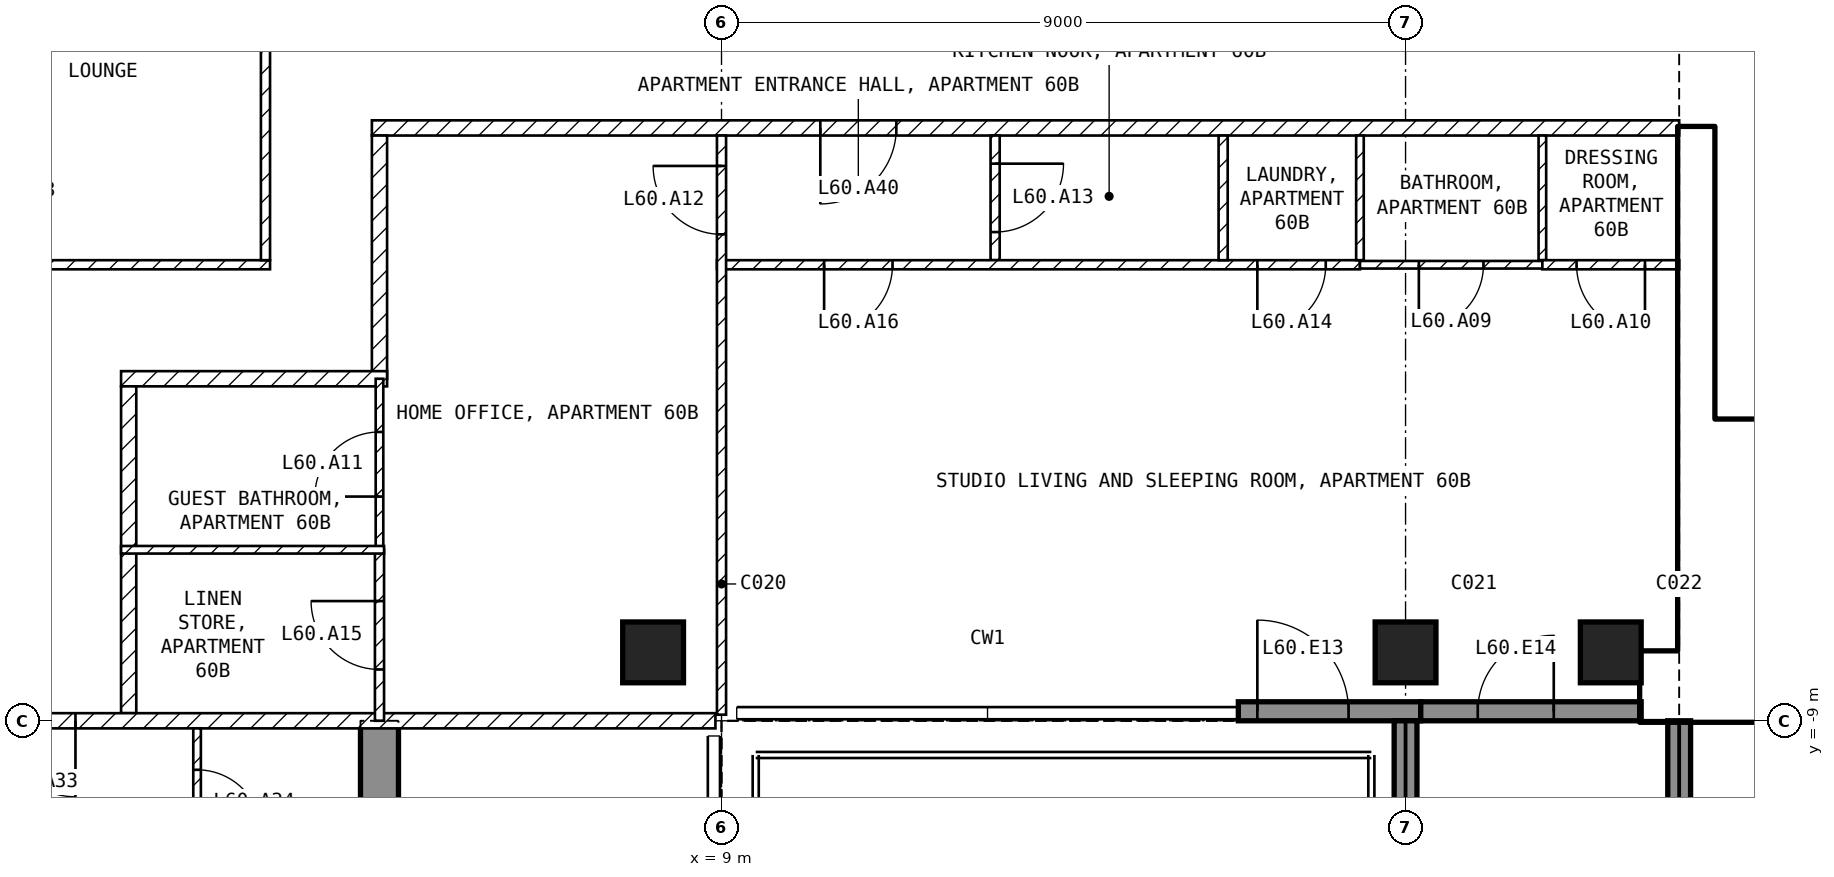
"""IFC4 building model, lengths in metres.
Left out: names, types, materials, properties, quantities, classifications, styles, units other than length and angle.
Written with IfcOpenShell. Run it as: python <this file> out.ifc"""

import sys

from ifc_helpers import new_model, si_unit, direction, frame, frame_2d, origin, origin_2d, place, context, subcontext, project, spatial, polyline, rectangle, outline, extrude, element, fill, save


model = new_model("IFC4")
c1 = context("Model", 3, precision=1e-05, world=origin(), true_north=direction((0.0, 1.0)))
c2 = subcontext(c1, "Body", "Model", "MODEL_VIEW")
j1 = project(units=[si_unit("LENGTHUNIT", "METRE"), si_unit("PLANEANGLEUNIT", "RADIAN")], contexts=[c1])
p1 = place(None, origin())
s1 = spatial("IfcSite", under=j1, at=p1, CompositionType="ELEMENT")
p2 = place(p1, origin())
s2 = spatial("IfcBuilding", under=s1, at=p2, CompositionType="ELEMENT")
p3 = place(p2, frame((0.0, 0.0, 239.5)))
s3 = spatial("IfcBuildingStorey", under=s2, at=p3, CompositionType="ELEMENT", Elevation=239.5)
for number, where, z_axis, x_axis in (
    (1, (8.1, -8.1, -0.25), (0.0, 0.0, 1.0), (1.0, 0.0, 0.0)),
    (2, (18.0, -8.1, -0.25), (0.0, 0.0, 1.0), (1.0, 0.0, 0.0)),
    (3, (20.7, -8.1, -0.25), (0.0, 0.0, 1.0), (1.0, 0.0, 0.0)),
):
    element("IfcColumn", number, at=place(p3, frame(where, z_axis=z_axis, x_axis=x_axis)), inside=s3, PredefinedType="COLUMN", context=c2, shape_type="SweptSolid", body=[
        extrude(rectangle(XDim=0.8, YDim=0.8, at=origin_2d()), origin(), (0.0, 0.0, 1.0), 3.5),
    ])
p4 = place(p3, frame((4.25, -16.7, -0.25), z_axis=(1.0, 0.0, 0.0), x_axis=(0.0, 1.0, 0.0)))
e4 = element("IfcWall", 4, at=p4, inside=s3, PredefinedType="SHEAR", context=c2, shape_type="SweptSolid", body=[
    extrude(outline(polyline([(0.0, 0.0), (3.2, 0.0), (3.2, 2.65), (5.6, 2.65), (5.6, 0.0), (7.7, 0.0), (7.7, 3.5), (0.0, 3.5), (0.0, 0.0)])), origin(), (0.0, 0.0, 1.0), 0.5),
])
p5 = place(p3, frame((15.8, -8.875, 0.0), z_axis=(0.0, 0.0, 1.0), x_axis=(1.0, 0.0, 0.0)))
e5 = element("IfcWall", 5, at=p5, inside=s3, PredefinedType="SOLIDWALL", context=c2, shape_type="SweptSolid", body=[
    extrude(rectangle(XDim=2.4, YDim=0.25, at=frame_2d((1.2, 0.0))), origin(), (0.0, 0.0, 1.0), 3.25),
])
p6 = place(p5, frame((0.25, 0.0, 0.0)))
e6 = element("IfcOpeningElement", 6, at=p6, cuts=e5, PredefinedType="OPENING", context=c2, shape_type="SweptSolid", body=[
    extrude(rectangle(XDim=1.2, YDim=2.4, at=frame_2d((0.6, 1.2))), frame((0.0, 0.135, 0.0), z_axis=(0.0, -1.0, 0.0), x_axis=(1.0, 0.0, 0.0)), (0.0, 0.0, 1.0), 0.27),
])
p7 = place(p3, frame((18.2, -8.875, 0.0), z_axis=(0.0, 0.0, 1.0), x_axis=(1.0, 0.0, 0.0)))
e7 = element("IfcWall", 7, at=p7, inside=s3, PredefinedType="SOLIDWALL", context=c2, shape_type="SweptSolid", body=[
    extrude(rectangle(XDim=2.9, YDim=0.25, at=frame_2d((1.45, 0.0))), origin(), (0.0, 0.0, 1.0), 3.25),
])
p8 = place(p7, frame((0.75, 0.0, 0.0)))
e8 = element("IfcOpeningElement", 8, at=p8, cuts=e7, PredefinedType="OPENING", context=c2, shape_type="SweptSolid", body=[
    extrude(rectangle(XDim=1.0, YDim=2.4, at=frame_2d((0.5, 1.2))), frame((0.0, 0.135, 0.0), z_axis=(0.0, -1.0, 0.0), x_axis=(1.0, 0.0, 0.0)), (0.0, 0.0, 1.0), 0.27),
])
p9 = place(p3, frame((18.0, -9.0, 0.0), z_axis=(0.0, 0.0, 1.0), x_axis=(0.0, -1.0, 0.0)))
e9 = element("IfcWall", 9, at=p9, inside=s3, PredefinedType="SOLIDWALL", context=c2, shape_type="SweptSolid", body=[
    extrude(rectangle(XDim=2.74, YDim=0.3, at=frame_2d((1.37, 0.0))), origin(), (0.0, 0.0, 1.0), 3.25),
])
p10 = place(p3, frame((21.6, -9.0, 0.0), z_axis=(0.0, 0.0, 1.0), x_axis=(0.0, -1.0, 0.0)))
e10 = element("IfcWall", 10, at=p10, inside=s3, PredefinedType="SOLIDWALL", context=c2, shape_type="SweptSolid", body=[
    extrude(rectangle(XDim=2.7, YDim=0.3, at=frame_2d((1.35, 0.0))), origin(), (0.0, 0.0, 1.0), 3.25),
])
p11 = place(p3, frame((21.1, -8.55, 0.0), z_axis=(0.0, 0.0, 1.0), x_axis=(1.0, 0.0, 0.0)))
e11 = element("IfcWall", 11, at=p11, inside=s3, PredefinedType="SHEAR", context=c2, shape_type="SweptSolid", body=[
    extrude(rectangle(XDim=9.1, YDim=0.9, at=frame_2d((4.55, 0.0))), origin(), (0.0, 0.0, 1.0), 3.25),
])
p12 = place(p3, frame((21.825, -8.1, 0.0), z_axis=(0.0, 0.0, 1.0), x_axis=(0.0, 1.0, 0.0)))
e12 = element("IfcWall", 12, at=p12, inside=s3, PredefinedType="SHEAR", context=c2, shape_type="SweptSolid", body=[
    extrude(rectangle(XDim=6.9, YDim=0.45, at=frame_2d((3.45, 0.0))), origin(), (0.0, 0.0, 1.0), 3.25),
])
p13 = place(p3, frame((22.05, -5.15, 0.0), z_axis=(0.0, 0.0, 1.0), x_axis=(1.0, 0.0, 0.0)))
e13 = element("IfcWall", 13, at=p13, inside=s3, PredefinedType="SOLIDWALL", context=c2, shape_type="SweptSolid", body=[
    extrude(rectangle(XDim=6.3, YDim=0.2, at=frame_2d((3.15, 0.0))), origin(), (0.0, 0.0, 1.0), 3.25),
])
p14 = place(p13, frame((0.2, 0.0, 0.0)))
e14 = element("IfcOpeningElement", 14, at=p14, cuts=e13, PredefinedType="OPENING", context=c2, shape_type="SweptSolid", body=[
    extrude(rectangle(XDim=1.0, YDim=2.1, at=frame_2d((0.5, 1.05))), frame((0.0, 0.11, 0.0), z_axis=(0.0, -1.0, 0.0), x_axis=(1.0, 0.0, 0.0)), (0.0, 0.0, 1.0), 0.22),
])
p15 = place(p3, frame((-3.06, -3.0, 0.0), z_axis=(0.0, 0.0, 1.0), x_axis=(1.0, 0.0, 0.0)))
e15 = element("IfcWall", 15, at=p15, inside=s3, PredefinedType="PARTITIONING", context=c2, shape_type="SweptSolid", body=[
    extrude(rectangle(XDim=6.12, YDim=0.12, at=frame_2d((3.06, 0.0))), origin(), (0.0, 0.0, 1.0), 3.25),
])
p16 = place(p3, frame((3.0, -2.94, 0.0), z_axis=(0.0, 0.0, 1.0), x_axis=(0.0, 1.0, 0.0)))
e16 = element("IfcWall", 16, at=p16, inside=s3, PredefinedType="PARTITIONING", context=c2, shape_type="SweptSolid", body=[
    extrude(rectangle(XDim=5.88, YDim=0.12, at=frame_2d((2.94, 0.0))), origin(), (0.0, 0.0, 1.0), 3.25),
])
p17 = place(p3, frame((21.6, -1.2, 0.0), z_axis=(0.0, 0.0, 1.0), x_axis=(-1.0, 0.0, 0.0)))
e17 = element("IfcWall", 17, at=p17, inside=s3, PredefinedType="PARTITIONING", context=c2, shape_type="SweptSolid", body=[
    extrude(rectangle(XDim=17.2, YDim=0.2, at=frame_2d((8.6, 0.0))), origin(), (0.0, 0.0, 1.0), 3.25),
])
p18 = place(p17, frame((10.3, 0.0, 0.0)))
e18 = element("IfcOpeningElement", 18, at=p18, cuts=e17, PredefinedType="OPENING", context=c2, shape_type="SweptSolid", body=[
    extrude(rectangle(XDim=1.0, YDim=2.1, at=frame_2d((0.5, 1.05))), frame((0.0, 0.11, 0.0), z_axis=(0.0, -1.0, 0.0), x_axis=(1.0, 0.0, 0.0)), (0.0, 0.0, 1.0), 0.22),
])
p19 = place(p3, frame((4.5, -1.3, 0.0), z_axis=(0.0, 0.0, 1.0), x_axis=(0.0, -1.0, 0.0)))
e19 = element("IfcWall", 19, at=p19, inside=s3, PredefinedType="PARTITIONING", context=c2, shape_type="SweptSolid", body=[
    extrude(rectangle(XDim=3.2, YDim=0.2, at=frame_2d((1.6, 0.0))), origin(), (0.0, 0.0, 1.0), 3.25),
])
p20 = place(p3, frame((4.6, -4.5, 0.0), z_axis=(0.0, 0.0, 1.0), x_axis=(-1.0, 0.0, 0.0)))
e20 = element("IfcWall", 20, at=p20, inside=s3, PredefinedType="PARTITIONING", context=c2, shape_type="SweptSolid", body=[
    extrude(rectangle(XDim=3.5, YDim=0.2, at=frame_2d((1.75, 0.0))), origin(), (0.0, 0.0, 1.0), 3.25),
])
p21 = place(p3, frame((1.2, -4.6, 0.0), z_axis=(0.0, 0.0, 1.0), x_axis=(0.0, -1.0, 0.0)))
e21 = element("IfcWall", 21, at=p21, inside=s3, PredefinedType="PARTITIONING", context=c2, shape_type="SweptSolid", body=[
    extrude(rectangle(XDim=4.3, YDim=0.2, at=frame_2d((2.15, 0.0))), origin(), (0.0, 0.0, 1.0), 3.25),
])
p22 = place(p3, frame((8.92, -9.0, 0.0), z_axis=(0.0, 0.0, 1.0), x_axis=(-1.0, 0.0, 0.0)))
e22 = element("IfcWall", 22, at=p22, inside=s3, PredefinedType="PARTITIONING", context=c2, shape_type="SweptSolid", body=[
    extrude(rectangle(XDim=17.84, YDim=0.2, at=frame_2d((8.92, 0.0))), origin(), (0.0, 0.0, 1.0), 3.25),
])
p23 = place(p22, frame((8.42, 0.0, 0.0)))
e23 = element("IfcOpeningElement", 23, at=p23, cuts=e22, PredefinedType="OPENING", context=c2, shape_type="SweptSolid", body=[
    extrude(rectangle(XDim=1.0, YDim=2.1, at=frame_2d((0.5, 1.05))), frame((0.0, 0.11, 0.0), z_axis=(0.0, -1.0, 0.0), x_axis=(1.0, 0.0, 0.0)), (0.0, 0.0, 1.0), 0.22),
])
p24 = place(p3, frame((12.6, -1.3, 0.0), z_axis=(0.0, 0.0, 1.0), x_axis=(0.0, -1.0, 0.0)))
e24 = element("IfcWall", 24, at=p24, inside=s3, PredefinedType="PARTITIONING", context=c2, shape_type="SweptSolid", body=[
    extrude(rectangle(XDim=1.64, YDim=0.12, at=frame_2d((0.82, 0.0))), origin(), (0.0, 0.0, 1.0), 3.25),
])
p25 = place(p24, frame((0.37, 0.0, 0.0)))
e25 = element("IfcOpeningElement", 25, at=p25, cuts=e24, PredefinedType="OPENING", context=c2, shape_type="SweptSolid", body=[
    extrude(rectangle(XDim=0.9, YDim=2.1, at=frame_2d((0.45, 1.05))), frame((0.0, 0.07, 0.0), z_axis=(0.0, -1.0, 0.0), x_axis=(1.0, 0.0, 0.0)), (0.0, 0.0, 1.0), 0.14),
])
p26 = place(p3, frame((17.4, -3.0, 0.0), z_axis=(0.0, 0.0, 1.0), x_axis=(-1.0, 0.0, 0.0)))
e26 = element("IfcWall", 26, at=p26, inside=s3, PredefinedType="PARTITIONING", context=c2, shape_type="SweptSolid", body=[
    extrude(rectangle(XDim=8.46, YDim=0.12, at=frame_2d((4.23, 0.0))), origin(), (0.0, 0.0, 1.0), 3.25),
])
p27 = place(p26, frame((0.45, 0.0, 0.0)))
e27 = element("IfcOpeningElement", 27, at=p27, cuts=e26, PredefinedType="OPENING", context=c2, shape_type="SweptSolid", body=[
    extrude(rectangle(XDim=0.9, YDim=2.1, at=frame_2d((0.45, 1.05))), frame((0.0, 0.07, 0.0), z_axis=(0.0, -1.0, 0.0), x_axis=(1.0, 0.0, 0.0)), (0.0, 0.0, 1.0), 0.14),
])
p28 = place(p26, frame((6.15, 0.0, 0.0)))
e28 = element("IfcOpeningElement", 28, at=p28, cuts=e26, PredefinedType="OPENING", context=c2, shape_type="SweptSolid", body=[
    extrude(rectangle(XDim=0.9, YDim=2.1, at=frame_2d((0.45, 1.05))), frame((0.0, 0.07, 0.0), z_axis=(0.0, -1.0, 0.0), x_axis=(1.0, 0.0, 0.0)), (0.0, 0.0, 1.0), 0.14),
])
p29 = place(p3, frame((9.0, -8.92, 0.0), z_axis=(0.0, 0.0, 1.0), x_axis=(0.0, 1.0, 0.0)))
e29 = element("IfcWall", 29, at=p29, inside=s3, PredefinedType="PARTITIONING", context=c2, shape_type="SweptSolid", body=[
    extrude(rectangle(XDim=7.62, YDim=0.12, at=frame_2d((3.81, 0.0))), origin(), (0.0, 0.0, 1.0), 3.25),
])
p30 = place(p29, frame((6.32, 0.0, 0.0)))
e30 = element("IfcOpeningElement", 30, at=p30, cuts=e29, PredefinedType="OPENING", context=c2, shape_type="SweptSolid", body=[
    extrude(rectangle(XDim=0.9, YDim=2.1, at=frame_2d((0.45, 1.05))), frame((0.0, 0.07, 0.0), z_axis=(0.0, -1.0, 0.0), x_axis=(1.0, 0.0, 0.0)), (0.0, 0.0, 1.0), 0.14),
])
p31 = place(p3, frame((15.6, -1.3, 0.0), z_axis=(0.0, 0.0, 1.0), x_axis=(0.0, -1.0, 0.0)))
e31 = element("IfcWall", 31, at=p31, inside=s3, PredefinedType="PARTITIONING", context=c2, shape_type="SweptSolid", body=[
    extrude(rectangle(XDim=1.64, YDim=0.12, at=frame_2d((0.82, 0.0))), origin(), (0.0, 0.0, 1.0), 3.25),
])
for number, where, z_axis, x_axis in (
    (32, (17.4, -1.3, 0.0), (0.0, 0.0, 1.0), (0.0, -1.0, 0.0)),
    (33, (19.8, -1.3, 0.0), (0.0, 0.0, 1.0), (0.0, -1.0, 0.0)),
):
    element("IfcWall", number, at=place(p3, frame(where, z_axis=z_axis, x_axis=x_axis)), inside=s3, PredefinedType="PARTITIONING", context=c2, shape_type="SweptSolid", body=[
        extrude(rectangle(XDim=1.64, YDim=0.1, at=frame_2d((0.82, 0.0))), origin(), (0.0, 0.0, 1.0), 3.25),
    ])
p32 = place(p3, frame((19.8, -3.0, 0.0), z_axis=(0.0, 0.0, 1.0), x_axis=(-1.0, 0.0, 0.0)))
e34 = element("IfcWall", 34, at=p32, inside=s3, PredefinedType="PARTITIONING", context=c2, shape_type="SweptSolid", body=[
    extrude(rectangle(XDim=2.4, YDim=0.1, at=frame_2d((1.2, 0.0))), origin(), (0.0, 0.0, 1.0), 3.25),
])
p33 = place(p32, frame((0.775, 0.0, 0.0)))
e35 = element("IfcOpeningElement", 35, at=p33, cuts=e34, PredefinedType="OPENING", context=c2, shape_type="SweptSolid", body=[
    extrude(rectangle(XDim=0.85, YDim=2.1, at=frame_2d((0.425, 1.05))), frame((0.0, 0.06, 0.0), z_axis=(0.0, -1.0, 0.0), x_axis=(1.0, 0.0, 0.0)), (0.0, 0.0, 1.0), 0.12),
])
p34 = place(p3, frame((21.6, -3.0, 0.0), z_axis=(0.0, 0.0, 1.0), x_axis=(-1.0, 0.0, 0.0)))
e36 = element("IfcWall", 36, at=p34, inside=s3, PredefinedType="PARTITIONING", context=c2, shape_type="SweptSolid", body=[
    extrude(rectangle(XDim=1.8, YDim=0.12, at=frame_2d((0.9, 0.0))), origin(), (0.0, 0.0, 1.0), 3.25),
])
p35 = place(p34, frame((0.45, 0.0, 0.0)))
e37 = element("IfcOpeningElement", 37, at=p35, cuts=e36, PredefinedType="OPENING", context=c2, shape_type="SweptSolid", body=[
    extrude(rectangle(XDim=0.9, YDim=2.1, at=frame_2d((0.45, 1.05))), frame((0.0, 0.07, 0.0), z_axis=(0.0, -1.0, 0.0), x_axis=(1.0, 0.0, 0.0)), (0.0, 0.0, 1.0), 0.14),
])
p36 = place(p3, frame((4.5, -6.75, 0.0), z_axis=(0.0, 0.0, 1.0), x_axis=(0.0, 1.0, 0.0)))
e38 = element("IfcWall", 38, at=p36, inside=s3, PredefinedType="PARTITIONING", context=c2, shape_type="SweptSolid", body=[
    extrude(rectangle(XDim=2.25, YDim=0.1, at=frame_2d((1.125, 0.0))), origin(), (0.0, 0.0, 1.0), 3.25),
])
p37 = place(p36, frame((0.7, 0.0, 0.0)))
e39 = element("IfcOpeningElement", 39, at=p37, cuts=e38, PredefinedType="OPENING", context=c2, shape_type="SweptSolid", body=[
    extrude(rectangle(XDim=0.85, YDim=2.1, at=frame_2d((0.425, 1.05))), frame((0.0, 0.06, 0.0), z_axis=(0.0, -1.0, 0.0), x_axis=(1.0, 0.0, 0.0)), (0.0, 0.0, 1.0), 0.12),
])
p38 = place(p3, frame((4.5, -9.0, 0.0), z_axis=(0.0, 0.0, 1.0), x_axis=(0.0, 1.0, 0.0)))
e40 = element("IfcWall", 40, at=p38, inside=s3, PredefinedType="PARTITIONING", context=c2, shape_type="SweptSolid", body=[
    extrude(rectangle(XDim=2.25, YDim=0.12, at=frame_2d((1.125, 0.0))), origin(), (0.0, 0.0, 1.0), 3.25),
])
p39 = place(p38, frame((0.675, 0.0, 0.0)))
e41 = element("IfcOpeningElement", 41, at=p39, cuts=e40, PredefinedType="OPENING", context=c2, shape_type="SweptSolid", body=[
    extrude(rectangle(XDim=0.9, YDim=2.1, at=frame_2d((0.45, 1.05))), frame((0.0, 0.07, 0.0), z_axis=(0.0, -1.0, 0.0), x_axis=(1.0, 0.0, 0.0)), (0.0, 0.0, 1.0), 0.14),
])
p40 = place(p3, frame((4.56, -6.75, 0.0), z_axis=(0.0, 0.0, 1.0), x_axis=(-1.0, 0.0, 0.0)))
e42 = element("IfcWall", 42, at=p40, inside=s3, PredefinedType="PARTITIONING", context=c2, shape_type="SweptSolid", body=[
    extrude(rectangle(XDim=3.46, YDim=0.1, at=frame_2d((1.73, 0.0))), origin(), (0.0, 0.0, 1.0), 3.25),
])
p41 = place(p3, frame((2.1, -9.1, 0.0), z_axis=(0.0, 0.0, 1.0), x_axis=(0.0, -1.0, 0.0)))
e43 = element("IfcWall", 43, at=p41, inside=s3, PredefinedType="PARTITIONING", context=c2, shape_type="SweptSolid", body=[
    extrude(rectangle(XDim=1.94, YDim=0.1, at=frame_2d((0.97, 0.0))), origin(), (0.0, 0.0, 1.0), 3.25),
])
p42 = place(p41, frame((0.545, 0.0, 0.0)))
e44 = element("IfcOpeningElement", 44, at=p42, cuts=e43, PredefinedType="OPENING", context=c2, shape_type="SweptSolid", body=[
    extrude(rectangle(XDim=0.85, YDim=2.1, at=frame_2d((0.425, 1.05))), frame((0.0, 0.06, 0.0), z_axis=(0.0, -1.0, 0.0), x_axis=(1.0, 0.0, 0.0)), (0.0, 0.0, 1.0), 0.12),
])
p43 = place(p6, origin())
e45 = element("IfcDoor", 45, at=p43, inside=s3, OperationType="SINGLE_SWING_LEFT", PredefinedType="DOOR", context=c2, shape_type="SweptSolid", body=[
    extrude(rectangle(XDim=1.2, YDim=2.4, at=frame_2d((0.6, 1.2))), frame((0.0, 0.025, 0.0), z_axis=(0.0, -1.0, 0.0), x_axis=(1.0, 0.0, 0.0)), (0.0, 0.0, 1.0), 0.05),
])
fill(e6, e45)
p44 = place(p8, origin())
e46 = element("IfcDoor", 46, at=p44, inside=s3, OperationType="SINGLE_SWING_RIGHT", PredefinedType="DOOR", context=c2, shape_type="SweptSolid", body=[
    extrude(rectangle(XDim=1.0, YDim=2.4, at=frame_2d((0.5, 1.2))), frame((0.0, 0.025, 0.0), z_axis=(0.0, -1.0, 0.0), x_axis=(1.0, 0.0, 0.0)), (0.0, 0.0, 1.0), 0.05),
])
fill(e8, e46)
p45 = place(p14, origin())
e47 = element("IfcDoor", 47, at=p45, inside=s3, OperationType="SINGLE_SWING_LEFT", PredefinedType="DOOR", context=c2, shape_type="SweptSolid", body=[
    extrude(rectangle(XDim=1.0, YDim=2.1, at=frame_2d((0.5, 1.05))), frame((0.0, 0.025, 0.0), z_axis=(0.0, -1.0, 0.0), x_axis=(1.0, 0.0, 0.0)), (0.0, 0.0, 1.0), 0.05),
])
fill(e14, e47)
p46 = place(p33, origin())
e48 = element("IfcDoor", 48, at=p46, inside=s3, OperationType="SINGLE_SWING_RIGHT", PredefinedType="DOOR", context=c2, shape_type="SweptSolid", body=[
    extrude(rectangle(XDim=0.85, YDim=2.1, at=frame_2d((0.425, 1.05))), frame((0.0, 0.025, 0.0), z_axis=(0.0, -1.0, 0.0), x_axis=(1.0, 0.0, 0.0)), (0.0, 0.0, 1.0), 0.05),
])
fill(e35, e48)
p47 = place(p35, origin())
e49 = element("IfcDoor", 49, at=p47, inside=s3, OperationType="SINGLE_SWING_LEFT", PredefinedType="DOOR", context=c2, shape_type="SweptSolid", body=[
    extrude(rectangle(XDim=0.9, YDim=2.1, at=frame_2d((0.45, 1.05))), frame((0.0, 0.025, 0.0), z_axis=(0.0, -1.0, 0.0), x_axis=(1.0, 0.0, 0.0)), (0.0, 0.0, 1.0), 0.05),
])
fill(e37, e49)
p48 = place(p37, origin())
e50 = element("IfcDoor", 50, at=p48, inside=s3, OperationType="SINGLE_SWING_LEFT", PredefinedType="DOOR", context=c2, shape_type="SweptSolid", body=[
    extrude(rectangle(XDim=0.85, YDim=2.1, at=frame_2d((0.425, 1.05))), frame((0.0, 0.025, 0.0), z_axis=(0.0, -1.0, 0.0), x_axis=(1.0, 0.0, 0.0)), (0.0, 0.0, 1.0), 0.05),
])
fill(e39, e50)
p49 = place(p30, origin())
e51 = element("IfcDoor", 51, at=p49, inside=s3, OperationType="SINGLE_SWING_RIGHT", PredefinedType="DOOR", context=c2, shape_type="SweptSolid", body=[
    extrude(rectangle(XDim=0.9, YDim=2.1, at=frame_2d((0.45, 1.05))), frame((0.0, 0.025, 0.0), z_axis=(0.0, -1.0, 0.0), x_axis=(1.0, 0.0, 0.0)), (0.0, 0.0, 1.0), 0.05),
])
fill(e30, e51)
p50 = place(p25, origin())
e52 = element("IfcDoor", 52, at=p50, inside=s3, OperationType="SINGLE_SWING_LEFT", PredefinedType="DOOR", context=c2, shape_type="SweptSolid", body=[
    extrude(rectangle(XDim=0.9, YDim=2.1, at=frame_2d((0.45, 1.05))), frame((0.0, 0.025, 0.0), z_axis=(0.0, -1.0, 0.0), x_axis=(1.0, 0.0, 0.0)), (0.0, 0.0, 1.0), 0.05),
])
fill(e25, e52)
p51 = place(p27, origin())
e53 = element("IfcDoor", 53, at=p51, inside=s3, OperationType="SINGLE_SWING_RIGHT", PredefinedType="DOOR", context=c2, shape_type="SweptSolid", body=[
    extrude(rectangle(XDim=0.9, YDim=2.1, at=frame_2d((0.45, 1.05))), frame((0.0, 0.025, 0.0), z_axis=(0.0, -1.0, 0.0), x_axis=(1.0, 0.0, 0.0)), (0.0, 0.0, 1.0), 0.05),
])
fill(e27, e53)
p52 = place(p39, origin())
e54 = element("IfcDoor", 54, at=p52, inside=s3, OperationType="SINGLE_SWING_RIGHT", PredefinedType="DOOR", context=c2, shape_type="SweptSolid", body=[
    extrude(rectangle(XDim=0.9, YDim=2.1, at=frame_2d((0.45, 1.05))), frame((0.0, 0.025, 0.0), z_axis=(0.0, -1.0, 0.0), x_axis=(1.0, 0.0, 0.0)), (0.0, 0.0, 1.0), 0.05),
])
fill(e41, e54)
p53 = place(p28, origin())
e55 = element("IfcDoor", 55, at=p53, inside=s3, OperationType="SINGLE_SWING_RIGHT", PredefinedType="DOOR", context=c2, shape_type="SweptSolid", body=[
    extrude(rectangle(XDim=0.9, YDim=2.1, at=frame_2d((0.45, 1.05))), frame((0.0, 0.025, 0.0), z_axis=(0.0, -1.0, 0.0), x_axis=(1.0, 0.0, 0.0)), (0.0, 0.0, 1.0), 0.05),
])
fill(e28, e55)
p54 = place(p23, origin())
e56 = element("IfcDoor", 56, at=p54, inside=s3, OperationType="SINGLE_SWING_LEFT", PredefinedType="DOOR", context=c2, shape_type="SweptSolid", body=[
    extrude(rectangle(XDim=1.0, YDim=2.1, at=frame_2d((0.5, 1.05))), frame((0.0, 0.025, 0.0), z_axis=(0.0, -1.0, 0.0), x_axis=(1.0, 0.0, 0.0)), (0.0, 0.0, 1.0), 0.05),
])
fill(e23, e56)
p55 = place(p42, origin())
e57 = element("IfcDoor", 57, at=p55, inside=s3, OperationType="SINGLE_SWING_RIGHT", PredefinedType="DOOR", context=c2, shape_type="SweptSolid", body=[
    extrude(rectangle(XDim=0.85, YDim=2.1, at=frame_2d((0.425, 1.05))), frame((0.0, 0.025, 0.0), z_axis=(0.0, -1.0, 0.0), x_axis=(1.0, 0.0, 0.0)), (0.0, 0.0, 1.0), 0.05),
])
fill(e44, e57)
p56 = place(p18, origin())
e58 = element("IfcDoor", 58, at=p56, inside=s3, OperationType="SINGLE_SWING_RIGHT", PredefinedType="DOOR", context=c2, shape_type="SweptSolid", body=[
    extrude(rectangle(XDim=1.0, YDim=2.1, at=frame_2d((0.5, 1.05))), frame((0.0, 0.025, 0.0), z_axis=(0.0, -1.0, 0.0), x_axis=(1.0, 0.0, 0.0)), (0.0, 0.0, 1.0), 0.05),
])
fill(e18, e58)
save(model, sys.argv[1])
